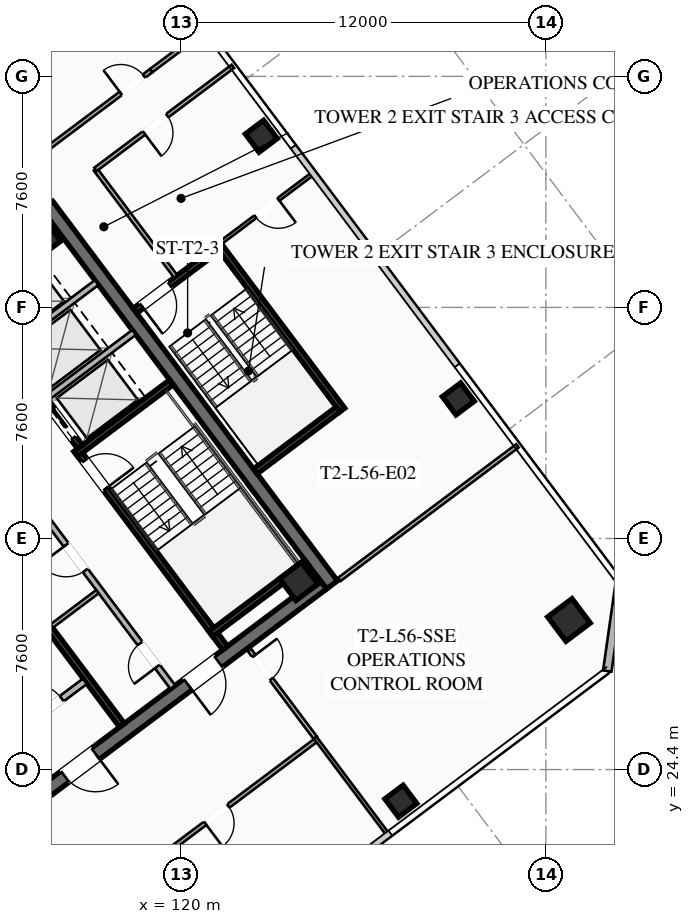
"""IFC4 building model, lengths in metres.
Left out: names, types, materials, properties, quantities, classifications, styles, units other than length and angle.
Written with IfcOpenShell. Run it as: python <this file> out.ifc"""

import sys

from ifc_helpers import new_model, si_unit, direction, frame, frame_2d, origin, origin_2d, place, context, subcontext, project, spatial, rectangle, hollow_rectangle, extrude, element, fill, save


model = new_model("IFC4")
c1 = context("Model", 3, precision=1e-05, world=origin(), true_north=direction((0.0, 1.0)))
c2 = subcontext(c1, "Body", "Model", "MODEL_VIEW")
j1 = project(units=[si_unit("LENGTHUNIT", "METRE"), si_unit("PLANEANGLEUNIT", "RADIAN")], contexts=[c1])
p1 = place(None, origin())
s1 = spatial("IfcSite", under=j1, at=p1, CompositionType="ELEMENT")
p2 = place(p1, origin())
s2 = spatial("IfcBuilding", under=s1, at=p2, CompositionType="ELEMENT")
p3 = place(p2, frame((0.0, 0.0, 207.75)))
s3 = spatial("IfcBuildingStorey", under=s2, at=p3, CompositionType="ELEMENT", Elevation=207.75)
p4 = place(p3, frame((115.604, 42.953, 0.0), z_axis=(0.0, 0.0, 1.0), x_axis=(0.600005007985, -0.799996243986, 0.0)))
e1 = element("IfcWall", 1, at=p4, inside=s3, PredefinedType="SHEAR", context=c2, shape_type="SweptSolid", body=[
    extrude(rectangle(XDim=15.6, YDim=0.45, at=frame_2d((7.8, 0.0))), origin(), (0.0, 0.0, 1.0), 3.55),
])
p5 = place(p3, frame((124.649, 30.518, 0.0), z_axis=(0.0, 0.0, 1.0), x_axis=(-0.8, -0.6, 0.0)))
e2 = element("IfcWall", 2, at=p5, inside=s3, PredefinedType="SHEAR", context=c2, shape_type="SweptSolid", body=[
    extrude(rectangle(XDim=15.26, YDim=0.45, at=frame_2d((7.63, 0.0))), origin(), (0.0, 0.0, 1.0), 3.55),
])
p6 = place(p5, frame((9.33, 0.0, 0.0)))
e3 = element("IfcOpeningElement", 3, at=p6, cuts=e2, PredefinedType="OPENING", context=c2, shape_type="SweptSolid", body=[
    extrude(rectangle(XDim=1.25, YDim=2.25, at=frame_2d((0.625, 1.125))), frame((0.0, 0.235, 0.0), z_axis=(0.0, -1.0, 0.0), x_axis=(1.0, 0.0, 0.0)), (0.0, 0.0, 1.0), 0.47),
])
p7 = place(p5, frame((4.28, 0.0, 0.0)))
e4 = element("IfcOpeningElement", 4, at=p7, cuts=e2, PredefinedType="OPENING", context=c2, shape_type="SweptSolid", body=[
    extrude(rectangle(XDim=1.25, YDim=2.25, at=frame_2d((0.625, 1.125))), frame((0.0, 0.235, 0.0), z_axis=(0.0, -1.0, 0.0), x_axis=(1.0, 0.0, 0.0)), (0.0, 0.0, 1.0), 0.47),
])
for number, where, z_axis, x_axis in (
    (5, (123.87, 30.59, 0.0), (0.0, 0.0, 1.0), (0.8, 0.6, 0.0)),
    (6, (115.41, 41.87, 0.0), (0.0, 0.0, 1.0), (0.8, 0.6, 0.0)),
):
    element("IfcColumn", number, at=place(p3, frame(where, z_axis=z_axis, x_axis=x_axis)), inside=s3, PredefinedType="COLUMN", context=c2, shape_type="SweptSolid", body=[
        extrude(hollow_rectangle(XDim=0.9, YDim=0.9, WallThickness=0.04, at=origin_2d()), origin(), (0.0, 0.0, 1.0), 3.37),
    ])
p8 = place(p3, frame((132.76, 29.32, 0.0), z_axis=(0.0, 0.0, 1.0), x_axis=(0.799999996291, 0.600000004945, 0.0)))
e7 = element("IfcColumn", 7, at=p8, inside=s3, PredefinedType="COLUMN", context=c2, shape_type="SweptSolid", body=[
    extrude(hollow_rectangle(XDim=1.0, YDim=1.0, WallThickness=0.04, at=origin_2d()), origin(), (0.0, 0.0, 1.0), 3.37),
])
for number, where, z_axis, x_axis in (
    (8, (127.23, 23.36, 0.0), (0.0, 0.0, 1.0), (0.8, 0.6, 0.0)),
    (9, (129.12, 36.59, 0.0), (0.0, 0.0, 1.0), (0.8, 0.6, 0.0)),
    (10, (122.64, 45.23, 0.0), (0.0, 0.0, 1.0), (0.8, 0.6, 0.0)),
):
    element("IfcColumn", number, at=place(p3, frame(where, z_axis=z_axis, x_axis=x_axis)), inside=s3, PredefinedType="COLUMN", context=c2, shape_type="SweptSolid", body=[
        extrude(hollow_rectangle(XDim=0.75, YDim=0.75, WallThickness=0.032, at=origin_2d()), origin(), (0.0, 0.0, 1.0), 3.37),
    ])
p9 = place(p3, frame((134.44, 30.58, 0.0), z_axis=(0.0, 0.0, 1.0), x_axis=(-0.14138683146, -0.989954425158, 0.0)))
e11 = element("IfcWall", 11, at=p9, inside=s3, PredefinedType="SOLIDWALL", context=c2, shape_type="SweptSolid", body=[
    extrude(rectangle(XDim=2.97, YDim=0.28, at=frame_2d((1.485, 0.0))), origin(), (0.0, 0.0, 1.0), 3.37),
])
p10 = place(p3, frame((116.56, 34.92, 0.0), z_axis=(0.0, 0.0, 1.0), x_axis=(0.59999041401, -0.800007189403, 0.0)))
e12 = element("IfcWall", 12, at=p10, inside=s3, PredefinedType="SHEAR", context=c2, shape_type="SweptSolid", body=[
    extrude(rectangle(XDim=8.15, YDim=0.2, at=frame_2d((4.075, 0.0))), origin(), (0.0, 0.0, 1.0), 3.37),
])
p11 = place(p10, frame((0.45, 0.0, 0.0)))
e13 = element("IfcOpeningElement", 13, at=p11, cuts=e12, PredefinedType="OPENING", context=c2, shape_type="SweptSolid", body=[
    extrude(rectangle(XDim=1.15, YDim=2.2, at=frame_2d((0.575, 1.1))), frame((0.0, 0.11, 0.0), z_axis=(0.0, -1.0, 0.0), x_axis=(1.0, 0.0, 0.0)), (0.0, 0.0, 1.0), 0.22),
])
for number, where, z_axis, x_axis in (
    (14, (116.54, 34.78, 0.0), (0.0, 0.0, 1.0), (0.8, 0.6, 0.0)),
    (15, (120.98, 28.86, 0.0), (0.0, 0.0, 1.0), (0.8, 0.6, 0.0)),
):
    element("IfcWall", number, at=place(p3, frame(where, z_axis=z_axis, x_axis=x_axis)), inside=s3, PredefinedType="SHEAR", context=c2, shape_type="SweptSolid", body=[
        extrude(rectangle(XDim=3.93, YDim=0.2, at=frame_2d((1.965, 0.0))), origin(), (0.0, 0.0, 1.0), 3.37),
    ])
p12 = place(p3, frame((118.058, 25.856, 0.0), z_axis=(0.0, 0.0, 1.0), x_axis=(-0.600002657301, 0.799998007018, 0.0)))
e16 = element("IfcWall", 16, at=p12, inside=s3, PredefinedType="SHEAR", context=c2, shape_type="SweptSolid", body=[
    extrude(rectangle(XDim=14.7, YDim=0.2, at=frame_2d((7.35, 0.0))), origin(), (0.0, 0.0, 1.0), 3.37),
])
p13 = place(p3, frame((114.316, 25.412, 0.0), z_axis=(0.0, 0.0, 1.0), x_axis=(0.800018601094, 0.59997519774, 0.0)))
e17 = element("IfcWall", 17, at=p13, inside=s3, PredefinedType="SOLIDWALL", context=c2, shape_type="SweptSolid", body=[
    extrude(rectangle(XDim=3.15, YDim=0.22, at=frame_2d((1.575, 0.0))), origin(), (0.0, 0.0, 1.0), 2.723),
])
p14 = place(p13, frame((0.95, 0.0, 0.0)))
e18 = element("IfcOpeningElement", 18, at=p14, cuts=e17, PredefinedType="OPENING", context=c2, shape_type="SweptSolid", body=[
    extrude(rectangle(XDim=1.25, YDim=2.25, at=frame_2d((0.625, 1.125))), frame((0.0, 0.12, 0.0), z_axis=(0.0, -1.0, 0.0), x_axis=(1.0, 0.0, 0.0)), (0.0, 0.0, 1.0), 0.24),
])
p15 = place(p3, frame((112.75, 40.25, 0.0), z_axis=(0.0, 0.0, 1.0), x_axis=(0.599994036198, -0.800004472816, 0.0)))
e19 = element("IfcWall", 19, at=p15, inside=s3, PredefinedType="SHEAR", context=c2, shape_type="SweptSolid", body=[
    extrude(rectangle(XDim=6.55, YDim=0.2, at=frame_2d((3.275, 0.0))), origin(), (0.0, 0.0, 1.0), 3.37),
])
p16 = place(p15, frame((5.075, 0.0, 0.0)))
e20 = element("IfcOpeningElement", 20, at=p16, cuts=e19, PredefinedType="OPENING", context=c2, shape_type="SweptSolid", body=[
    extrude(rectangle(XDim=1.1, YDim=2.2, at=frame_2d((0.55, 1.1))), frame((0.0, 0.11, 0.0), z_axis=(0.0, -1.0, 0.0), x_axis=(1.0, 0.0, 0.0)), (0.0, 0.0, 1.0), 0.22),
])
p17 = place(p15, frame((3.025, 0.0, 0.0)))
e21 = element("IfcOpeningElement", 21, at=p17, cuts=e19, PredefinedType="OPENING", context=c2, shape_type="SweptSolid", body=[
    extrude(rectangle(XDim=1.1, YDim=2.2, at=frame_2d((0.55, 1.1))), frame((0.0, 0.11, 0.0), z_axis=(0.0, -1.0, 0.0), x_axis=(1.0, 0.0, 0.0)), (0.0, 0.0, 1.0), 0.22),
])
p18 = place(p15, frame((1.025, 0.0, 0.0)))
e22 = element("IfcOpeningElement", 22, at=p18, cuts=e19, PredefinedType="OPENING", context=c2, shape_type="SweptSolid", body=[
    extrude(rectangle(XDim=1.1, YDim=2.2, at=frame_2d((0.55, 1.1))), frame((0.0, 0.11, 0.0), z_axis=(0.0, -1.0, 0.0), x_axis=(1.0, 0.0, 0.0)), (0.0, 0.0, 1.0), 0.22),
])
for number, where, z_axis, x_axis in (
    (23, (115.59, 36.63, 0.0), (0.0, 0.0, 1.0), (0.8, 0.6, 0.0)),
    (24, (114.36, 38.27, 0.0), (0.0, 0.0, 1.0), (0.8, 0.6, 0.0)),
):
    element("IfcWall", number, at=place(p3, frame(where, z_axis=z_axis, x_axis=x_axis)), inside=s3, PredefinedType="SOLIDWALL", context=c2, shape_type="SweptSolid", body=[
        extrude(rectangle(XDim=3.58, YDim=0.2, at=frame_2d((1.79, 0.0))), origin(), (0.0, 0.0, 1.0), 3.37),
    ])
p19 = place(p3, frame((119.73, 27.11, 0.0), z_axis=(0.0, 0.0, 1.0), x_axis=(-0.600005580459, 0.799995814625, 0.0)))
e25 = element("IfcWall", 25, at=p19, inside=s3, PredefinedType="SOLIDWALL", context=c2, shape_type="SweptSolid", body=[
    extrude(rectangle(XDim=7.0, YDim=0.2, at=frame_2d((3.5, 0.0))), origin(), (0.0, 0.0, 1.0), 2.723),
])
p20 = place(p19, frame((0.85, 0.0, 0.0)))
e26 = element("IfcOpeningElement", 26, at=p20, cuts=e25, PredefinedType="OPENING", context=c2, shape_type="SweptSolid", body=[
    extrude(rectangle(XDim=0.95, YDim=2.05, at=frame_2d((0.475, 1.025))), frame((0.0, 0.11, 0.0), z_axis=(0.0, -1.0, 0.0), x_axis=(1.0, 0.0, 0.0)), (0.0, 0.0, 1.0), 0.22),
])
p21 = place(p19, frame((4.8, 0.0, 0.0)))
e27 = element("IfcOpeningElement", 27, at=p21, cuts=e25, PredefinedType="OPENING", context=c2, shape_type="SweptSolid", body=[
    extrude(rectangle(XDim=1.05, YDim=2.2, at=frame_2d((0.525, 1.1))), frame((0.0, 0.11, 0.0), z_axis=(0.0, -1.0, 0.0), x_axis=(1.0, 0.0, 0.0)), (0.0, 0.0, 1.0), 0.22),
])
p22 = place(p3, frame((115.746, 29.122, 0.0), z_axis=(0.0, 0.0, 1.0), x_axis=(0.8, 0.6, 0.0)))
e28 = element("IfcWall", 28, at=p22, inside=s3, PredefinedType="PARTITIONING", context=c2, shape_type="SweptSolid", body=[
    extrude(rectangle(XDim=1.88, YDim=0.135, at=frame_2d((0.94, 0.0))), origin(), (0.0, 0.0, 1.0), 2.723),
])
p23 = place(p3, frame((125.304, 36.228, 0.0), z_axis=(0.0, 0.0, 1.0), x_axis=(-0.59998851072, 0.800008616831, 0.0)))
e29 = element("IfcWall", 29, at=p23, inside=s3, PredefinedType="SHEAR", context=c2, shape_type="SweptSolid", body=[
    extrude(rectangle(XDim=6.8, YDim=0.2, at=frame_2d((3.4, 0.0))), origin(), (0.0, 0.0, 1.0), 3.37),
])
p24 = place(p3, frame((121.204, 41.528, 0.0), z_axis=(0.0, 0.0, 1.0), x_axis=(-0.800017232136, -0.599977023131, 0.0)))
e30 = element("IfcWall", 30, at=p24, inside=s3, PredefinedType="SHEAR", context=c2, shape_type="SweptSolid", body=[
    extrude(rectangle(XDim=3.4, YDim=0.2, at=frame_2d((1.7, 0.0))), origin(), (0.0, 0.0, 1.0), 3.37),
])
p25 = place(p24, frame((1.975, 0.0, 0.0)))
e31 = element("IfcOpeningElement", 31, at=p25, cuts=e30, PredefinedType="OPENING", context=c2, shape_type="SweptSolid", body=[
    extrude(rectangle(XDim=1.15, YDim=2.2, at=frame_2d((0.575, 1.1))), frame((0.0, 0.11, 0.0), z_axis=(0.0, -1.0, 0.0), x_axis=(1.0, 0.0, 0.0)), (0.0, 0.0, 1.0), 0.22),
])
p26 = place(p3, frame((122.444, 34.208, 0.0), z_axis=(0.0, 0.0, 1.0), x_axis=(0.79999138319, 0.600011488909, 0.0)))
e32 = element("IfcWall", 32, at=p26, inside=s3, PredefinedType="SHEAR", context=c2, shape_type="SweptSolid", body=[
    extrude(rectangle(XDim=3.4, YDim=0.2, at=frame_2d((1.7, 0.0))), origin(), (0.0, 0.0, 1.0), 3.37),
])
p27 = place(p3, frame((119.824, 40.618, 0.0), z_axis=(0.0, 0.0, 1.0), x_axis=(-0.599982243973, 0.800013316712, 0.0)))
e33 = element("IfcWall", 33, at=p27, inside=s3, PredefinedType="PARTITIONING", context=c2, shape_type="SweptSolid", body=[
    extrude(rectangle(XDim=4.4, YDim=0.135, at=frame_2d((2.2, 0.0))), origin(), (0.0, 0.0, 1.0), 2.723),
])
p28 = place(p3, frame((100.756, 33.692, 0.0), z_axis=(0.0, 0.0, 1.0), x_axis=(0.799998716732, 0.60000171102, 0.0)))
e34 = element("IfcWall", 34, at=p28, inside=s3, PredefinedType="PARTITIONING", context=c2, shape_type="SweptSolid", body=[
    extrude(rectangle(XDim=22.83, YDim=0.135, at=frame_2d((11.415, 0.0))), origin(), (0.0, 0.0, 1.0), 2.723),
])
p29 = place(p28, frame((9.38, 0.0, 0.0)))
e35 = element("IfcOpeningElement", 35, at=p29, cuts=e34, PredefinedType="OPENING", context=c2, shape_type="SweptSolid", body=[
    extrude(rectangle(XDim=0.95, YDim=2.05, at=frame_2d((0.475, 1.025))), frame((0.0, 0.077, 0.0), z_axis=(0.0, -1.0, 0.0), x_axis=(1.0, 0.0, 0.0)), (0.0, 0.0, 1.0), 0.155),
])
p30 = place(p28, frame((21.58, 0.0, 0.0)))
e36 = element("IfcOpeningElement", 36, at=p30, cuts=e34, PredefinedType="OPENING", context=c2, shape_type="SweptSolid", body=[
    extrude(rectangle(XDim=0.95, YDim=2.05, at=frame_2d((0.475, 1.025))), frame((0.0, 0.077, 0.0), z_axis=(0.0, -1.0, 0.0), x_axis=(1.0, 0.0, 0.0)), (0.0, 0.0, 1.0), 0.155),
])
p31 = place(p3, frame((119.02, 47.39, 0.0), z_axis=(0.0, 0.0, 1.0), x_axis=(0.799960585956, 0.600052548463, 0.0)))
e37 = element("IfcWall", 37, at=p31, inside=s3, PredefinedType="PARTITIONING", context=c2, shape_type="SweptSolid", body=[
    extrude(rectangle(XDim=2.23, YDim=0.135, at=frame_2d((1.115, 0.0))), origin(), (0.0, 0.0, 1.0), 2.723),
])
p32 = place(p3, frame((124.462, 25.384, 0.0), z_axis=(0.0, 0.0, 1.0), x_axis=(-0.799997904343, -0.6000027942, 0.0)))
e38 = element("IfcWall", 38, at=p32, inside=s3, PredefinedType="PARTITIONING", context=c2, shape_type="SweptSolid", body=[
    extrude(rectangle(XDim=13.98, YDim=0.135, at=frame_2d((6.99, 0.0))), origin(), (0.0, 0.0, 1.0), 2.723),
])
p33 = place(p32, frame((3.635, 0.0, 0.0)))
e39 = element("IfcOpeningElement", 39, at=p33, cuts=e38, PredefinedType="OPENING", context=c2, shape_type="SweptSolid", body=[
    extrude(rectangle(XDim=0.95, YDim=2.05, at=frame_2d((0.475, 1.025))), frame((0.0, 0.077, 0.0), z_axis=(0.0, -1.0, 0.0), x_axis=(1.0, 0.0, 0.0)), (0.0, 0.0, 1.0), 0.155),
])
p34 = place(p3, frame((122.248, 28.336, 0.0), z_axis=(0.0, 0.0, 1.0), x_axis=(0.600010820699, -0.799991884361, 0.0)))
e40 = element("IfcWall", 40, at=p34, inside=s3, PredefinedType="PARTITIONING", context=c2, shape_type="SweptSolid", body=[
    extrude(rectangle(XDim=3.61, YDim=0.135, at=frame_2d((1.805, 0.0))), origin(), (0.0, 0.0, 1.0), 2.723),
])
p35 = place(p34, frame((0.25, 0.0, 0.0)))
e41 = element("IfcOpeningElement", 41, at=p35, cuts=e40, PredefinedType="OPENING", context=c2, shape_type="SweptSolid", body=[
    extrude(rectangle(XDim=0.95, YDim=2.05, at=frame_2d((0.475, 1.025))), frame((0.0, 0.077, 0.0), z_axis=(0.0, -1.0, 0.0), x_axis=(1.0, 0.0, 0.0)), (0.0, 0.0, 1.0), 0.155),
])
p36 = place(p3, frame((126.808, 22.256, 0.0), z_axis=(0.0, 0.0, 1.0), x_axis=(-0.600019580308, 0.799985314394, 0.0)))
e42 = element("IfcWall", 42, at=p36, inside=s3, PredefinedType="PARTITIONING", context=c2, shape_type="SweptSolid", body=[
    extrude(rectangle(XDim=3.99, YDim=0.11, at=frame_2d((1.995, 0.0))), origin(), (0.0, 0.0, 1.0), 2.723),
])
p37 = place(p3, frame((121.704, 47.528, 0.0), z_axis=(0.0, 0.0, 1.0), x_axis=(-0.799989629485, -0.600013827105, 0.0)))
e43 = element("IfcWall", 43, at=p37, inside=s3, PredefinedType="PARTITIONING", context=c2, shape_type="SweptSolid", body=[
    extrude(rectangle(XDim=5.65, YDim=0.135, at=frame_2d((2.825, 0.0))), origin(), (0.0, 0.0, 1.0), 2.723),
])
p38 = place(p37, frame((2.7, 0.0, 0.0)))
e44 = element("IfcOpeningElement", 44, at=p38, cuts=e43, PredefinedType="OPENING", context=c2, shape_type="SweptSolid", body=[
    extrude(rectangle(XDim=0.95, YDim=2.05, at=frame_2d((0.475, 1.025))), frame((0.0, 0.077, 0.0), z_axis=(0.0, -1.0, 0.0), x_axis=(1.0, 0.0, 0.0)), (0.0, 0.0, 1.0), 0.155),
])
p39 = place(p3, frame((125.208, 30.656, 0.0), z_axis=(0.0, 0.0, 1.0), x_axis=(0.79999199534, 0.600010672732, 0.0)))
e45 = element("IfcWall", 45, at=p39, inside=s3, PredefinedType="PARTITIONING", context=c2, shape_type="SweptSolid", body=[
    extrude(rectangle(XDim=7.32, YDim=0.135, at=frame_2d((3.66, 0.0))), origin(), (0.0, 0.0, 1.0), 2.723),
])
p40 = place(p3, frame((124.344, 44.008, 0.0), z_axis=(0.0, 0.0, 1.0), x_axis=(-0.8, -0.6, 0.0)))
e46 = element("IfcWall", 46, at=p40, inside=s3, PredefinedType="PARTITIONING", context=c2, shape_type="SweptSolid", body=[
    extrude(rectangle(XDim=3.8, YDim=0.11, at=frame_2d((1.9, 0.0))), origin(), (0.0, 0.0, 1.0), 2.723),
])
p41 = place(p40, frame((1.425, 0.0, 0.0)))
e47 = element("IfcOpeningElement", 47, at=p41, cuts=e46, PredefinedType="OPENING", context=c2, shape_type="SweptSolid", body=[
    extrude(rectangle(XDim=0.95, YDim=2.05, at=frame_2d((0.475, 1.025))), frame((0.0, 0.065, 0.0), z_axis=(0.0, -1.0, 0.0), x_axis=(1.0, 0.0, 0.0)), (0.0, 0.0, 1.0), 0.13),
])
p42 = place(p6, origin())
e48 = element("IfcDoor", 48, at=p42, inside=s3, OperationType="SINGLE_SWING_LEFT", PredefinedType="DOOR", context=c2, shape_type="SweptSolid", body=[
    extrude(rectangle(XDim=1.25, YDim=2.25, at=frame_2d((0.625, 1.125))), frame((0.0, 0.025, 0.0), z_axis=(0.0, -1.0, 0.0), x_axis=(1.0, 0.0, 0.0)), (0.0, 0.0, 1.0), 0.05),
])
fill(e3, e48)
p43 = place(p7, origin())
e49 = element("IfcDoor", 49, at=p43, inside=s3, OperationType="SINGLE_SWING_RIGHT", PredefinedType="DOOR", context=c2, shape_type="SweptSolid", body=[
    extrude(rectangle(XDim=1.25, YDim=2.25, at=frame_2d((0.625, 1.125))), frame((0.0, 0.025, 0.0), z_axis=(0.0, -1.0, 0.0), x_axis=(1.0, 0.0, 0.0)), (0.0, 0.0, 1.0), 0.05),
])
fill(e4, e49)
p44 = place(p11, origin())
e50 = element("IfcDoor", 50, at=p44, inside=s3, OperationType="SINGLE_SWING_RIGHT", PredefinedType="DOOR", context=c2, shape_type="SweptSolid", body=[
    extrude(rectangle(XDim=1.15, YDim=2.2, at=frame_2d((0.575, 1.1))), frame((0.0, 0.025, 0.0), z_axis=(0.0, -1.0, 0.0), x_axis=(1.0, 0.0, 0.0)), (0.0, 0.0, 1.0), 0.05),
])
fill(e13, e50)
p45 = place(p14, origin())
e51 = element("IfcDoor", 51, at=p45, inside=s3, OperationType="SINGLE_SWING_LEFT", PredefinedType="DOOR", context=c2, shape_type="SweptSolid", body=[
    extrude(rectangle(XDim=1.25, YDim=2.25, at=frame_2d((0.625, 1.125))), frame((0.0, 0.025, 0.0), z_axis=(0.0, -1.0, 0.0), x_axis=(1.0, 0.0, 0.0)), (0.0, 0.0, 1.0), 0.05),
])
fill(e18, e51)
p46 = place(p20, origin())
e52 = element("IfcDoor", 52, at=p46, inside=s3, OperationType="SINGLE_SWING_LEFT", PredefinedType="DOOR", context=c2, shape_type="SweptSolid", body=[
    extrude(rectangle(XDim=0.95, YDim=2.05, at=frame_2d((0.475, 1.025))), frame((0.0, 0.025, 0.0), z_axis=(0.0, -1.0, 0.0), x_axis=(1.0, 0.0, 0.0)), (0.0, 0.0, 1.0), 0.05),
])
fill(e26, e52)
p47 = place(p21, origin())
e53 = element("IfcDoor", 53, at=p47, inside=s3, OperationType="SINGLE_SWING_RIGHT", PredefinedType="DOOR", context=c2, shape_type="SweptSolid", body=[
    extrude(rectangle(XDim=1.05, YDim=2.2, at=frame_2d((0.525, 1.1))), frame((0.0, 0.025, 0.0), z_axis=(0.0, -1.0, 0.0), x_axis=(1.0, 0.0, 0.0)), (0.0, 0.0, 1.0), 0.05),
])
fill(e27, e53)
p48 = place(p25, origin())
e54 = element("IfcDoor", 54, at=p48, inside=s3, OperationType="SINGLE_SWING_RIGHT", PredefinedType="DOOR", context=c2, shape_type="SweptSolid", body=[
    extrude(rectangle(XDim=1.15, YDim=2.2, at=frame_2d((0.575, 1.1))), frame((0.0, 0.025, 0.0), z_axis=(0.0, -1.0, 0.0), x_axis=(1.0, 0.0, 0.0)), (0.0, 0.0, 1.0), 0.05),
])
fill(e31, e54)
p49 = place(p30, origin())
e55 = element("IfcDoor", 55, at=p49, inside=s3, OperationType="SINGLE_SWING_LEFT", PredefinedType="DOOR", context=c2, shape_type="SweptSolid", body=[
    extrude(rectangle(XDim=0.95, YDim=2.05, at=frame_2d((0.475, 1.025))), frame((0.0, 0.025, 0.0), z_axis=(0.0, -1.0, 0.0), x_axis=(1.0, 0.0, 0.0)), (0.0, 0.0, 1.0), 0.05),
])
fill(e36, e55)
p50 = place(p33, origin())
e56 = element("IfcDoor", 56, at=p50, inside=s3, OperationType="SINGLE_SWING_RIGHT", PredefinedType="DOOR", context=c2, shape_type="SweptSolid", body=[
    extrude(rectangle(XDim=0.95, YDim=2.05, at=frame_2d((0.475, 1.025))), frame((0.0, 0.025, 0.0), z_axis=(0.0, -1.0, 0.0), x_axis=(1.0, 0.0, 0.0)), (0.0, 0.0, 1.0), 0.05),
])
fill(e39, e56)
p51 = place(p35, origin())
e57 = element("IfcDoor", 57, at=p51, inside=s3, OperationType="SINGLE_SWING_LEFT", PredefinedType="DOOR", context=c2, shape_type="SweptSolid", body=[
    extrude(rectangle(XDim=0.95, YDim=2.05, at=frame_2d((0.475, 1.025))), frame((0.0, 0.025, 0.0), z_axis=(0.0, -1.0, 0.0), x_axis=(1.0, 0.0, 0.0)), (0.0, 0.0, 1.0), 0.05),
])
fill(e41, e57)
p52 = place(p38, origin())
e58 = element("IfcDoor", 58, at=p52, inside=s3, OperationType="SINGLE_SWING_RIGHT", PredefinedType="DOOR", context=c2, shape_type="SweptSolid", body=[
    extrude(rectangle(XDim=0.95, YDim=2.05, at=frame_2d((0.475, 1.025))), frame((0.0, 0.025, 0.0), z_axis=(0.0, -1.0, 0.0), x_axis=(1.0, 0.0, 0.0)), (0.0, 0.0, 1.0), 0.05),
])
fill(e44, e58)
p53 = place(p41, origin())
e59 = element("IfcDoor", 59, at=p53, inside=s3, OperationType="SINGLE_SWING_LEFT", PredefinedType="DOOR", context=c2, shape_type="SweptSolid", body=[
    extrude(rectangle(XDim=0.95, YDim=2.05, at=frame_2d((0.475, 1.025))), frame((0.0, 0.025, 0.0), z_axis=(0.0, -1.0, 0.0), x_axis=(1.0, 0.0, 0.0)), (0.0, 0.0, 1.0), 0.05),
])
fill(e47, e59)
p54 = place(p16, origin())
e60 = element("IfcDoor", 60, at=p54, inside=s3, OperationType="SLIDING_TO_LEFT", PredefinedType="DOOR", context=c2, shape_type="SweptSolid", body=[
    extrude(rectangle(XDim=1.1, YDim=2.2, at=frame_2d((0.55, 1.1))), frame((0.0, 0.025, 0.0), z_axis=(0.0, -1.0, 0.0), x_axis=(1.0, 0.0, 0.0)), (0.0, 0.0, 1.0), 0.05),
])
fill(e20, e60)
save(model, sys.argv[1])
